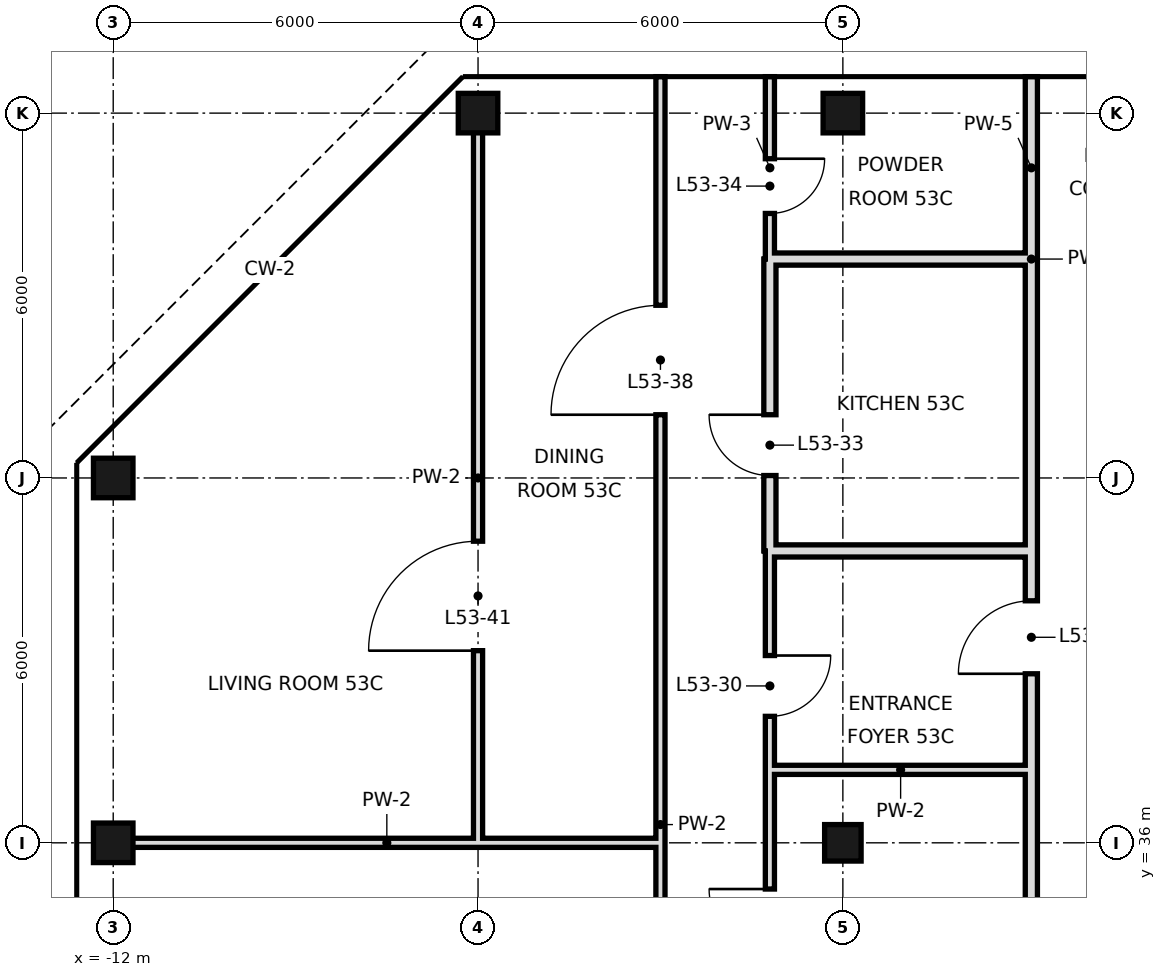
"""IFC4 building model, lengths in metres.
Left out: names, types, materials, properties, quantities, classifications, styles, units other than length and angle.
Written with IfcOpenShell. Run it as: python <this file> out.ifc"""

import sys

from ifc_helpers import new_model, si_unit, direction, frame, frame_2d, origin, origin_2d, place, context, subcontext, project, spatial, rectangle, hollow_rectangle, extrude, element, fill, save


model = new_model("IFC4")
c1 = context("Model", 3, precision=1e-05, world=origin(), true_north=direction((0.0, 1.0)))
c2 = subcontext(c1, "Body", "Model", "MODEL_VIEW")
j1 = project(units=[si_unit("LENGTHUNIT", "METRE"), si_unit("PLANEANGLEUNIT", "RADIAN")], contexts=[c1])
p1 = place(None, origin())
s1 = spatial("IfcSite", under=j1, at=p1, CompositionType="ELEMENT")
p2 = place(p1, origin())
s2 = spatial("IfcBuilding", under=s1, at=p2, CompositionType="ELEMENT")
p3 = place(p2, frame((0.0, 0.0, 226.2)))
s3 = spatial("IfcBuildingStorey", under=s2, at=p3, CompositionType="ELEMENT", Elevation=226.2)
for number, where, z_axis, x_axis in (
    (1, (-12.0, 36.0, 0.0), (0.0, 0.0, 1.0), (1.0, 0.0, 0.0)),
    (2, (-12.0, 42.0, 0.0), (0.0, 0.0, 1.0), (1.0, 0.0, 0.0)),
    (3, (-6.0, 48.0, 0.0), (0.0, 0.0, 1.0), (1.0, 0.0, 0.0)),
):
    element("IfcColumn", number, at=place(p3, frame(where, z_axis=z_axis, x_axis=x_axis)), inside=s3, PredefinedType="COLUMN", context=c2, shape_type="SweptSolid", body=[
        extrude(hollow_rectangle(XDim=0.65, YDim=0.65, WallThickness=0.032, at=origin_2d()), origin(), (0.0, 0.0, 1.0), 3.6),
    ])
p4 = place(p3, frame((0.0, 36.0, 0.0), z_axis=(0.0, 0.0, 1.0), x_axis=(1.0, 0.0, 0.0)))
e4 = element("IfcColumn", 4, at=p4, inside=s3, PredefinedType="COLUMN", context=c2, shape_type="SweptSolid", body=[
    extrude(hollow_rectangle(XDim=0.6, YDim=0.6, WallThickness=0.028, at=origin_2d()), origin(), (0.0, 0.0, 1.0), 3.6),
])
p5 = place(p3, frame((0.0, 48.0, 0.0), z_axis=(0.0, 0.0, 1.0), x_axis=(1.0, 0.0, 0.0)))
e5 = element("IfcColumn", 5, at=p5, inside=s3, PredefinedType="COLUMN", context=c2, shape_type="SweptSolid", body=[
    extrude(hollow_rectangle(XDim=0.65, YDim=0.65, WallThickness=0.032, at=origin_2d()), origin(), (0.0, 0.0, 1.0), 3.6),
])
p6 = place(p3, frame((-1.2, 40.8, 0.0), z_axis=(0.0, 0.0, 1.0), x_axis=(0.0, 1.0, 0.0)))
e6 = element("IfcWall", 6, at=p6, inside=s3, PredefinedType="SOLIDWALL", context=c2, shape_type="SweptSolid", body=[
    extrude(rectangle(XDim=4.8, YDim=0.2, at=frame_2d((2.4, 0.0))), origin(), (0.0, 0.0, 1.0), 2.72),
])
p7 = place(p6, frame((1.24, 0.0, 0.0)))
e7 = element("IfcOpeningElement", 7, at=p7, cuts=e6, PredefinedType="OPENING", context=c2, shape_type="SweptSolid", body=[
    extrude(rectangle(XDim=1.0, YDim=2.4, at=frame_2d((0.5, 1.2))), frame((0.0, 0.11, 0.0), z_axis=(0.0, -1.0, 0.0), x_axis=(1.0, 0.0, 0.0)), (0.0, 0.0, 1.0), 0.22),
])
p8 = place(p3, frame((-1.2, 18.0, 0.0), z_axis=(0.0, 0.0, 1.0), x_axis=(0.0, 1.0, 0.0)))
e8 = element("IfcWall", 8, at=p8, inside=s3, PredefinedType="PARTITIONING", context=c2, shape_type="SweptSolid", body=[
    extrude(rectangle(XDim=22.8, YDim=0.15, at=frame_2d((11.4, 0.0))), origin(), (0.0, 0.0, 1.0), 3.42),
])
p9 = place(p8, frame((20.08, 0.0, 0.0)))
e9 = element("IfcOpeningElement", 9, at=p9, cuts=e8, PredefinedType="OPENING", context=c2, shape_type="SweptSolid", body=[
    extrude(rectangle(XDim=1.0, YDim=2.4, at=frame_2d((0.5, 1.2))), frame((0.0, 0.085, 0.0), z_axis=(0.0, -1.0, 0.0), x_axis=(1.0, 0.0, 0.0)), (0.0, 0.0, 1.0), 0.17),
])
p10 = place(p8, frame((7.6, 0.0, 0.0)))
e10 = element("IfcOpeningElement", 10, at=p10, cuts=e8, PredefinedType="OPENING", context=c2, shape_type="SweptSolid", body=[
    extrude(rectangle(XDim=1.0, YDim=2.4, at=frame_2d((0.5, 1.2))), frame((0.0, 0.085, 0.0), z_axis=(0.0, -1.0, 0.0), x_axis=(1.0, 0.0, 0.0)), (0.0, 0.0, 1.0), 0.17),
])
p11 = place(p8, frame((16.24, 0.0, 0.0)))
e11 = element("IfcOpeningElement", 11, at=p11, cuts=e8, PredefinedType="OPENING", context=c2, shape_type="SweptSolid", body=[
    extrude(rectangle(XDim=1.0, YDim=2.4, at=frame_2d((0.5, 1.2))), frame((0.0, 0.085, 0.0), z_axis=(0.0, -1.0, 0.0), x_axis=(1.0, 0.0, 0.0)), (0.0, 0.0, 1.0), 0.17),
])
p12 = place(p3, frame((-1.2, 45.6, 0.0), z_axis=(0.0, 0.0, 1.0), x_axis=(0.0, 1.0, 0.0)))
e12 = element("IfcWall", 12, at=p12, inside=s3, PredefinedType="PARTITIONING", context=c2, shape_type="SweptSolid", body=[
    extrude(rectangle(XDim=3.0, YDim=0.15, at=frame_2d((1.5, 0.0))), origin(), (0.0, 0.0, 1.0), 3.42),
])
p13 = place(p12, frame((0.75, 0.0, 0.0)))
e13 = element("IfcOpeningElement", 13, at=p13, cuts=e12, PredefinedType="OPENING", context=c2, shape_type="SweptSolid", body=[
    extrude(rectangle(XDim=0.9, YDim=2.4, at=frame_2d((0.45, 1.2))), frame((0.0, 0.085, 0.0), z_axis=(0.0, -1.0, 0.0), x_axis=(1.0, 0.0, 0.0)), (0.0, 0.0, 1.0), 0.17),
])
p14 = place(p3, frame((-3.0, 24.0, 0.0), z_axis=(0.0, 0.0, 1.0), x_axis=(0.0, 1.0, 0.0)))
e14 = element("IfcWall", 14, at=p14, inside=s3, PredefinedType="PARTITIONING", context=c2, shape_type="SweptSolid", body=[
    extrude(rectangle(XDim=24.6, YDim=0.15, at=frame_2d((12.3, 0.0))), origin(), (0.0, 0.0, 1.0), 3.42),
])
p15 = place(p14, frame((2.5, 0.0, 0.0)))
e15 = element("IfcOpeningElement", 15, at=p15, cuts=e14, PredefinedType="OPENING", context=c2, shape_type="SweptSolid", body=[
    extrude(rectangle(XDim=1.0, YDim=2.4, at=frame_2d((0.5, 1.2))), frame((0.0, 0.085, 0.0), z_axis=(0.0, -1.0, 0.0), x_axis=(1.0, 0.0, 0.0)), (0.0, 0.0, 1.0), 0.17),
])
p16 = place(p14, frame((7.6, 0.0, 0.0)))
e16 = element("IfcOpeningElement", 16, at=p16, cuts=e14, PredefinedType="OPENING", context=c2, shape_type="SweptSolid", body=[
    extrude(rectangle(XDim=1.0, YDim=2.4, at=frame_2d((0.5, 1.2))), frame((0.0, 0.085, 0.0), z_axis=(0.0, -1.0, 0.0), x_axis=(1.0, 0.0, 0.0)), (0.0, 0.0, 1.0), 0.17),
])
p17 = place(p14, frame((19.04, 0.0, 0.0)))
e17 = element("IfcOpeningElement", 17, at=p17, cuts=e14, PredefinedType="OPENING", context=c2, shape_type="SweptSolid", body=[
    extrude(rectangle(XDim=1.8, YDim=2.4, at=frame_2d((0.9, 1.2))), frame((0.0, 0.085, 0.0), z_axis=(0.0, -1.0, 0.0), x_axis=(1.0, 0.0, 0.0)), (0.0, 0.0, 1.0), 0.17),
])
p18 = place(p3, frame((-6.0, 36.0, 0.0), z_axis=(0.0, 0.0, 1.0), x_axis=(0.0, 1.0, 0.0)))
e18 = element("IfcWall", 18, at=p18, inside=s3, PredefinedType="PARTITIONING", context=c2, shape_type="SweptSolid", body=[
    extrude(rectangle(XDim=12.0, YDim=0.15, at=frame_2d((6.0, 0.0))), origin(), (0.0, 0.0, 1.0), 3.42),
])
p19 = place(p18, frame((3.16, 0.0, 0.0)))
e19 = element("IfcOpeningElement", 19, at=p19, cuts=e18, PredefinedType="OPENING", context=c2, shape_type="SweptSolid", body=[
    extrude(rectangle(XDim=1.8, YDim=2.4, at=frame_2d((0.9, 1.2))), frame((0.0, 0.085, 0.0), z_axis=(0.0, -1.0, 0.0), x_axis=(1.0, 0.0, 0.0)), (0.0, 0.0, 1.0), 0.17),
])
p20 = place(p3, frame((3.1, 18.7, 0.0), z_axis=(0.0, 0.0, 1.0), x_axis=(0.0, 1.0, 0.0)))
e20 = element("IfcWall", 20, at=p20, inside=s3, PredefinedType="SOLIDWALL", context=c2, shape_type="SweptSolid", body=[
    extrude(rectangle(XDim=22.1, YDim=0.2, at=frame_2d((11.05, 0.0))), origin(), (0.0, 0.0, 1.0), 2.97),
])
p21 = place(p20, frame((20.08, 0.0, 0.0)))
e21 = element("IfcOpeningElement", 21, at=p21, cuts=e20, PredefinedType="OPENING", context=c2, shape_type="SweptSolid", body=[
    extrude(rectangle(XDim=1.2, YDim=2.4, at=frame_2d((0.6, 1.2))), frame((0.0, 0.11, 0.0), z_axis=(0.0, -1.0, 0.0), x_axis=(1.0, 0.0, 0.0)), (0.0, 0.0, 1.0), 0.22),
])
p22 = place(p3, frame((3.1, 45.6, 0.0), z_axis=(0.0, 0.0, 1.0), x_axis=(0.0, 1.0, 0.0)))
e22 = element("IfcWall", 22, at=p22, inside=s3, PredefinedType="SOLIDWALL", context=c2, shape_type="SweptSolid", body=[
    extrude(rectangle(XDim=3.0, YDim=0.2, at=frame_2d((1.5, 0.0))), origin(), (0.0, 0.0, 1.0), 2.72),
])
p23 = place(p3, frame((3.1, 40.8, 0.0), z_axis=(0.0, 0.0, 1.0), x_axis=(0.0, 1.0, 0.0)))
e23 = element("IfcWall", 23, at=p23, inside=s3, PredefinedType="SOLIDWALL", context=c2, shape_type="SweptSolid", body=[
    extrude(rectangle(XDim=4.8, YDim=0.2, at=frame_2d((2.4, 0.0))), origin(), (0.0, 0.0, 1.0), 2.97),
])
p24 = place(p3, frame((-12.0, 36.0, 0.0), z_axis=(0.0, 0.0, 1.0), x_axis=(1.0, 0.0, 0.0)))
e24 = element("IfcWall", 24, at=p24, inside=s3, PredefinedType="PARTITIONING", context=c2, shape_type="SweptSolid", body=[
    extrude(rectangle(XDim=9.0, YDim=0.15, at=frame_2d((4.5, 0.0))), origin(), (0.0, 0.0, 1.0), 2.72),
])
p25 = place(p3, frame((-1.2, 37.2, 0.0), z_axis=(0.0, 0.0, 1.0), x_axis=(1.0, 0.0, 0.0)))
e25 = element("IfcWall", 25, at=p25, inside=s3, PredefinedType="PARTITIONING", context=c2, shape_type="SweptSolid", body=[
    extrude(rectangle(XDim=4.3, YDim=0.15, at=frame_2d((2.15, 0.0))), origin(), (0.0, 0.0, 1.0), 3.42),
])
for number, where, z_axis, x_axis in (
    (26, (-1.2, 40.8, 0.0), (0.0, 0.0, 1.0), (1.0, 0.0, 0.0)),
    (27, (-1.2, 45.6, 0.0), (0.0, 0.0, 1.0), (1.0, 0.0, 0.0)),
):
    element("IfcWall", number, at=place(p3, frame(where, z_axis=z_axis, x_axis=x_axis)), inside=s3, PredefinedType="SOLIDWALL", context=c2, shape_type="SweptSolid", body=[
        extrude(rectangle(XDim=4.3, YDim=0.2, at=frame_2d((2.15, 0.0))), origin(), (0.0, 0.0, 1.0), 2.72),
    ])
p26 = place(p9, origin())
e28 = element("IfcDoor", 28, at=p26, inside=s3, OperationType="SINGLE_SWING_RIGHT", PredefinedType="DOOR", context=c2, shape_type="SweptSolid", body=[
    extrude(rectangle(XDim=1.0, YDim=2.4, at=frame_2d((0.5, 1.2))), frame((0.0, 0.025, 0.0), z_axis=(0.0, -1.0, 0.0), x_axis=(1.0, 0.0, 0.0)), (0.0, 0.0, 1.0), 0.05),
])
fill(e9, e28)
p27 = place(p11, frame((1.0, 0.0, 0.0), z_axis=(0.0, 0.0, 1.0), x_axis=(-1.0, 0.0, 0.0)))
e29 = element("IfcDoor", 29, at=p27, inside=s3, OperationType="SINGLE_SWING_LEFT", PredefinedType="DOOR", context=c2, shape_type="SweptSolid", body=[
    extrude(rectangle(XDim=1.0, YDim=2.4, at=frame_2d((0.5, 1.2))), frame((0.0, 0.025, 0.0), z_axis=(0.0, -1.0, 0.0), x_axis=(1.0, 0.0, 0.0)), (0.0, 0.0, 1.0), 0.05),
])
fill(e11, e29)
p28 = place(p7, frame((1.0, 0.0, 0.0), z_axis=(0.0, 0.0, 1.0), x_axis=(-1.0, 0.0, 0.0)))
e30 = element("IfcDoor", 30, at=p28, inside=s3, OperationType="SINGLE_SWING_LEFT", PredefinedType="DOOR", context=c2, shape_type="SweptSolid", body=[
    extrude(rectangle(XDim=1.0, YDim=2.4, at=frame_2d((0.5, 1.2))), frame((0.0, 0.025, 0.0), z_axis=(0.0, -1.0, 0.0), x_axis=(1.0, 0.0, 0.0)), (0.0, 0.0, 1.0), 0.05),
])
fill(e7, e30)
p29 = place(p13, origin())
e31 = element("IfcDoor", 31, at=p29, inside=s3, OperationType="SINGLE_SWING_RIGHT", PredefinedType="DOOR", context=c2, shape_type="SweptSolid", body=[
    extrude(rectangle(XDim=0.9, YDim=2.4, at=frame_2d((0.45, 1.2))), frame((0.0, 0.025, 0.0), z_axis=(0.0, -1.0, 0.0), x_axis=(1.0, 0.0, 0.0)), (0.0, 0.0, 1.0), 0.05),
])
fill(e13, e31)
p30 = place(p17, origin())
e32 = element("IfcDoor", 32, at=p30, inside=s3, OperationType="SINGLE_SWING_LEFT", PredefinedType="DOOR", context=c2, shape_type="SweptSolid", body=[
    extrude(rectangle(XDim=1.8, YDim=2.4, at=frame_2d((0.9, 1.2))), frame((0.0, 0.025, 0.0), z_axis=(0.0, -1.0, 0.0), x_axis=(1.0, 0.0, 0.0)), (0.0, 0.0, 1.0), 0.05),
])
fill(e17, e32)
p31 = place(p19, origin())
e33 = element("IfcDoor", 33, at=p31, inside=s3, OperationType="SINGLE_SWING_LEFT", PredefinedType="DOOR", context=c2, shape_type="SweptSolid", body=[
    extrude(rectangle(XDim=1.8, YDim=2.4, at=frame_2d((0.9, 1.2))), frame((0.0, 0.025, 0.0), z_axis=(0.0, -1.0, 0.0), x_axis=(1.0, 0.0, 0.0)), (0.0, 0.0, 1.0), 0.05),
])
fill(e19, e33)
p32 = place(p21, origin())
e34 = element("IfcDoor", 34, at=p32, inside=s3, OperationType="SINGLE_SWING_LEFT", PredefinedType="DOOR", context=c2, shape_type="SweptSolid", body=[
    extrude(rectangle(XDim=1.2, YDim=2.4, at=frame_2d((0.6, 1.2))), frame((0.0, 0.025, 0.0), z_axis=(0.0, -1.0, 0.0), x_axis=(1.0, 0.0, 0.0)), (0.0, 0.0, 1.0), 0.05),
])
fill(e21, e34)
save(model, sys.argv[1])
